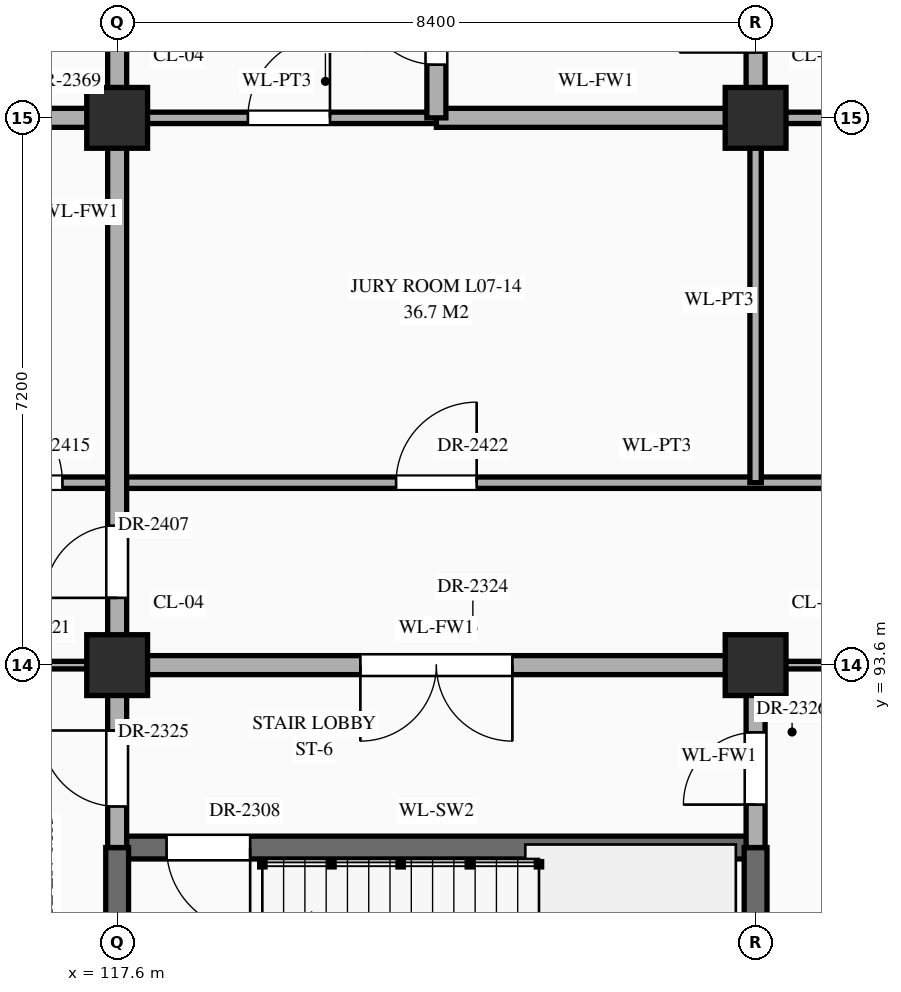
"""IFC4 building model, lengths in metres.
Left out: names, types, materials, properties, quantities, classifications, styles, units other than length and angle.
Written with IfcOpenShell. Run it as: python <this file> out.ifc"""

import sys

from ifc_helpers import new_model, si_unit, direction, frame, frame_2d, origin, origin_2d, place, context, subcontext, project, spatial, rectangle, extrude, element, fill, save


model = new_model("IFC4")
c1 = context("Model", 3, precision=1e-05, world=origin(), true_north=direction((0.0, 1.0)))
c2 = subcontext(c1, "Body", "Model", "MODEL_VIEW")
j1 = project(units=[si_unit("LENGTHUNIT", "METRE"), si_unit("PLANEANGLEUNIT", "RADIAN")], contexts=[c1])
p1 = place(None, origin())
s1 = spatial("IfcSite", under=j1, at=p1, CompositionType="ELEMENT")
p2 = place(p1, origin())
s2 = spatial("IfcBuilding", under=s1, at=p2, CompositionType="ELEMENT")
p3 = place(p2, frame((0.0, 0.0, 30.6)))
s3 = spatial("IfcBuildingStorey", under=s2, at=p3, CompositionType="ELEMENT", Elevation=30.6)
for number, where, z_axis, x_axis in (
    (1, (117.6, 93.6, 0.0), (0.0, 0.0, 1.0), (1.0, 0.0, 0.0)),
    (2, (117.6, 100.8, 0.0), (0.0, 0.0, 1.0), (1.0, 0.0, 0.0)),
    (3, (126.0, 93.6, 0.0), (0.0, 0.0, 1.0), (1.0, 0.0, 0.0)),
    (4, (126.0, 100.8, 0.0), (0.0, 0.0, 1.0), (1.0, 0.0, 0.0)),
):
    element("IfcColumn", number, at=place(p3, frame(where, z_axis=z_axis, x_axis=x_axis)), inside=s3, PredefinedType="COLUMN", context=c2, shape_type="SweptSolid", body=[
        extrude(rectangle(XDim=0.8, YDim=0.8, at=origin_2d()), origin(), (0.0, 0.0, 1.0), 4.5),
    ])
p4 = place(p3, frame((117.6, 91.2, 0.0), z_axis=(0.0, 0.0, 1.0), x_axis=(1.0, 0.0, 0.0)))
e5 = element("IfcWall", 5, at=p4, inside=s3, PredefinedType="SHEAR", context=c2, shape_type="SweptSolid", body=[
    extrude(rectangle(XDim=8.4, YDim=0.3, at=frame_2d((4.2, 0.0))), origin(), (0.0, 0.0, 1.0), 4.24),
])
p5 = place(p4, frame((0.65, 0.0, 0.0)))
e6 = element("IfcOpeningElement", 6, at=p5, cuts=e5, PredefinedType="OPENING", context=c2, shape_type="SweptSolid", body=[
    extrude(rectangle(XDim=1.1, YDim=2.2, at=frame_2d((0.55, 1.1))), frame((0.0, 0.162, 0.0), z_axis=(0.0, -1.0, 0.0), x_axis=(1.0, 0.0, 0.0)), (0.0, 0.0, 1.0), 0.324),
])
p6 = place(p3, frame((109.2, 93.6, 0.0), z_axis=(0.0, 0.0, 1.0), x_axis=(1.0, 0.0, 0.0)))
e7 = element("IfcWall", 7, at=p6, inside=s3, PredefinedType="STANDARD", context=c2, shape_type="SweptSolid", body=[
    extrude(rectangle(XDim=8.4, YDim=0.1, at=frame_2d((4.2, 0.0))), origin(), (0.0, 0.0, 1.0), 3.39),
])
p7 = place(p6, frame((1.09, 0.0, 0.0)))
e8 = element("IfcOpeningElement", 8, at=p7, cuts=e7, PredefinedType="OPENING", context=c2, shape_type="SweptSolid", body=[
    extrude(rectangle(XDim=0.94, YDim=2.3, at=frame_2d((0.47, 1.15))), frame((0.0, 0.062, 0.0), z_axis=(0.0, -1.0, 0.0), x_axis=(1.0, 0.0, 0.0)), (0.0, 0.0, 1.0), 0.124),
])
p8 = place(p6, frame((3.71, 0.0, 0.0)))
e9 = element("IfcOpeningElement", 9, at=p8, cuts=e7, PredefinedType="OPENING", context=c2, shape_type="SweptSolid", body=[
    extrude(rectangle(XDim=0.98, YDim=2.35, at=frame_2d((0.49, 1.175))), frame((0.0, 0.062, 0.0), z_axis=(0.0, -1.0, 0.0), x_axis=(1.0, 0.0, 0.0)), (0.0, 0.0, 1.0), 0.124),
])
p9 = place(p6, frame((6.33, 0.0, 0.0)))
e10 = element("IfcOpeningElement", 10, at=p9, cuts=e7, PredefinedType="OPENING", context=c2, shape_type="SweptSolid", body=[
    extrude(rectangle(XDim=1.02, YDim=2.4, at=frame_2d((0.51, 1.2))), frame((0.0, 0.062, 0.0), z_axis=(0.0, -1.0, 0.0), x_axis=(1.0, 0.0, 0.0)), (0.0, 0.0, 1.0), 0.124),
])
p10 = place(p3, frame((117.6, 93.6, 0.0), z_axis=(0.0, 0.0, 1.0), x_axis=(1.0, 0.0, 0.0)))
e11 = element("IfcWall", 11, at=p10, inside=s3, PredefinedType="STANDARD", context=c2, shape_type="SweptSolid", body=[
    extrude(rectangle(XDim=8.4, YDim=0.25, at=frame_2d((4.2, 0.0))), origin(), (0.0, 0.0, 1.0), 3.39),
])
p11 = place(p10, frame((3.2, 0.0, 0.0)))
e12 = element("IfcOpeningElement", 12, at=p11, cuts=e11, PredefinedType="OPENING", context=c2, shape_type="SweptSolid", body=[
    extrude(rectangle(XDim=2.0, YDim=2.4, at=frame_2d((1.0, 1.2))), frame((0.0, 0.137, 0.0), z_axis=(0.0, -1.0, 0.0), x_axis=(1.0, 0.0, 0.0)), (0.0, 0.0, 1.0), 0.274),
])
p12 = place(p3, frame((126.0, 93.6, 0.0), z_axis=(0.0, 0.0, 1.0), x_axis=(1.0, 0.0, 0.0)))
e13 = element("IfcWall", 13, at=p12, inside=s3, PredefinedType="STANDARD", context=c2, shape_type="SweptSolid", body=[
    extrude(rectangle(XDim=16.76, YDim=0.1, at=frame_2d((8.38, 0.0))), origin(), (0.0, 0.0, 1.0), 3.1),
])
p13 = place(p12, frame((3.88, 0.0, 0.0)))
e14 = element("IfcOpeningElement", 14, at=p13, cuts=e13, PredefinedType="OPENING", context=c2, shape_type="SweptSolid", body=[
    extrude(rectangle(XDim=0.96, YDim=2.2, at=frame_2d((0.48, 1.1))), frame((0.0, 0.062, 0.0), z_axis=(0.0, -1.0, 0.0), x_axis=(1.0, 0.0, 0.0)), (0.0, 0.0, 1.0), 0.124),
])
p14 = place(p12, frame((9.3, 0.0, 0.0)))
e15 = element("IfcOpeningElement", 15, at=p14, cuts=e13, PredefinedType="OPENING", context=c2, shape_type="SweptSolid", body=[
    extrude(rectangle(XDim=1.0, YDim=2.25, at=frame_2d((0.5, 1.125))), frame((0.0, 0.062, 0.0), z_axis=(0.0, -1.0, 0.0), x_axis=(1.0, 0.0, 0.0)), (0.0, 0.0, 1.0), 0.124),
])
p15 = place(p12, frame((11.7, 0.0, 0.0)))
e16 = element("IfcOpeningElement", 16, at=p15, cuts=e13, PredefinedType="OPENING", context=c2, shape_type="SweptSolid", body=[
    extrude(rectangle(XDim=1.8, YDim=2.5, at=frame_2d((0.9, 1.25))), frame((0.0, 0.062, 0.0), z_axis=(0.0, -1.0, 0.0), x_axis=(1.0, 0.0, 0.0)), (0.0, 0.0, 1.0), 0.124),
])
p16 = place(p12, frame((14.7, 0.0, 0.0)))
e17 = element("IfcOpeningElement", 17, at=p16, cuts=e13, PredefinedType="OPENING", context=c2, shape_type="SweptSolid", body=[
    extrude(rectangle(XDim=1.08, YDim=2.25, at=frame_2d((0.54, 1.125))), frame((0.0, 0.062, 0.0), z_axis=(0.0, -1.0, 0.0), x_axis=(1.0, 0.0, 0.0)), (0.0, 0.0, 1.0), 0.124),
])
p17 = place(p3, frame((115.0, 96.0, 0.0), z_axis=(0.0, 0.0, 1.0), x_axis=(1.0, 0.0, 0.0)))
e18 = element("IfcWall", 18, at=p17, inside=s3, PredefinedType="STANDARD", context=c2, shape_type="SweptSolid", body=[
    extrude(rectangle(XDim=19.4, YDim=0.15, at=frame_2d((9.7, 0.0))), origin(), (0.0, 0.0, 1.0), 4.24),
])
p18 = place(p17, frame((0.72, 0.0, 0.0)))
e19 = element("IfcOpeningElement", 19, at=p18, cuts=e18, PredefinedType="OPENING", context=c2, shape_type="SweptSolid", body=[
    extrude(rectangle(XDim=1.16, YDim=2.3, at=frame_2d((0.58, 1.15))), frame((0.0, 0.087, 0.0), z_axis=(0.0, -1.0, 0.0), x_axis=(1.0, 0.0, 0.0)), (0.0, 0.0, 1.0), 0.174),
])
p19 = place(p17, frame((6.27, 0.0, 0.0)))
e20 = element("IfcOpeningElement", 20, at=p19, cuts=e18, PredefinedType="OPENING", context=c2, shape_type="SweptSolid", body=[
    extrude(rectangle(XDim=1.06, YDim=2.4, at=frame_2d((0.53, 1.2))), frame((0.0, 0.087, 0.0), z_axis=(0.0, -1.0, 0.0), x_axis=(1.0, 0.0, 0.0)), (0.0, 0.0, 1.0), 0.174),
])
p20 = place(p17, frame((14.63, 0.0, 0.0)))
e21 = element("IfcOpeningElement", 21, at=p20, cuts=e18, PredefinedType="OPENING", context=c2, shape_type="SweptSolid", body=[
    extrude(rectangle(XDim=1.14, YDim=2.4, at=frame_2d((0.57, 1.2))), frame((0.0, 0.087, 0.0), z_axis=(0.0, -1.0, 0.0), x_axis=(1.0, 0.0, 0.0)), (0.0, 0.0, 1.0), 0.174),
])
p21 = place(p3, frame((113.4, 100.8, 0.0), z_axis=(0.0, 0.0, 1.0), x_axis=(1.0, 0.0, 0.0)))
e22 = element("IfcWall", 22, at=p21, inside=s3, PredefinedType="STANDARD", context=c2, shape_type="SweptSolid", body=[
    extrude(rectangle(XDim=4.2, YDim=0.25, at=frame_2d((2.1, 0.0))), origin(), (0.0, 0.0, 1.0), 3.39),
])
p22 = place(p21, frame((0.325, 0.0, 0.0)))
e23 = element("IfcOpeningElement", 23, at=p22, cuts=e22, PredefinedType="OPENING", context=c2, shape_type="SweptSolid", body=[
    extrude(rectangle(XDim=0.95, YDim=2.15, at=frame_2d((0.475, 1.075))), frame((0.0, 0.137, 0.0), z_axis=(0.0, -1.0, 0.0), x_axis=(1.0, 0.0, 0.0)), (0.0, 0.0, 1.0), 0.274),
])
p23 = place(p21, frame((2.19, 0.0, 0.0)))
e24 = element("IfcOpeningElement", 24, at=p23, cuts=e22, PredefinedType="OPENING", context=c2, shape_type="SweptSolid", body=[
    extrude(rectangle(XDim=1.1, YDim=2.2, at=frame_2d((0.55, 1.1))), frame((0.0, 0.137, 0.0), z_axis=(0.0, -1.0, 0.0), x_axis=(1.0, 0.0, 0.0)), (0.0, 0.0, 1.0), 0.274),
])
p24 = place(p3, frame((117.6, 100.8, 0.0), z_axis=(0.0, 0.0, 1.0), x_axis=(1.0, 0.0, 0.0)))
e25 = element("IfcWall", 25, at=p24, inside=s3, PredefinedType="STANDARD", context=c2, shape_type="SweptSolid", body=[
    extrude(rectangle(XDim=4.2, YDim=0.15, at=frame_2d((2.1, 0.0))), origin(), (0.0, 0.0, 1.0), 3.39),
])
p25 = place(p24, frame((1.72, 0.0, 0.0)))
e26 = element("IfcOpeningElement", 26, at=p25, cuts=e25, PredefinedType="OPENING", context=c2, shape_type="SweptSolid", body=[
    extrude(rectangle(XDim=1.08, YDim=2.25, at=frame_2d((0.54, 1.125))), frame((0.0, 0.087, 0.0), z_axis=(0.0, -1.0, 0.0), x_axis=(1.0, 0.0, 0.0)), (0.0, 0.0, 1.0), 0.174),
])
p26 = place(p3, frame((121.8, 100.8, 0.0), z_axis=(0.0, 0.0, 1.0), x_axis=(1.0, 0.0, 0.0)))
e27 = element("IfcWall", 27, at=p26, inside=s3, PredefinedType="STANDARD", context=c2, shape_type="SweptSolid", body=[
    extrude(rectangle(XDim=4.2, YDim=0.25, at=frame_2d((2.1, 0.0))), origin(), (0.0, 0.0, 1.0), 3.39),
])
p27 = place(p3, frame((126.0, 100.8, 0.0), z_axis=(0.0, 0.0, 1.0), x_axis=(1.0, 0.0, 0.0)))
e28 = element("IfcWall", 28, at=p27, inside=s3, PredefinedType="STANDARD", context=c2, shape_type="SweptSolid", body=[
    extrude(rectangle(XDim=8.4, YDim=0.15, at=frame_2d((4.2, 0.0))), origin(), (0.0, 0.0, 1.0), 3.3),
])
p28 = place(p27, frame((3.68, 0.0, 0.0)))
e29 = element("IfcOpeningElement", 29, at=p28, cuts=e28, PredefinedType="OPENING", context=c2, shape_type="SweptSolid", body=[
    extrude(rectangle(XDim=1.04, YDim=2.2, at=frame_2d((0.52, 1.1))), frame((0.0, 0.087, 0.0), z_axis=(0.0, -1.0, 0.0), x_axis=(1.0, 0.0, 0.0)), (0.0, 0.0, 1.0), 0.174),
])
p29 = place(p3, frame((117.6, 86.4, 0.0), z_axis=(0.0, 0.0, 1.0), x_axis=(0.0, 1.0, 0.0)))
e30 = element("IfcWall", 30, at=p29, inside=s3, PredefinedType="SHEAR", context=c2, shape_type="SweptSolid", body=[
    extrude(rectangle(XDim=4.8, YDim=0.3, at=frame_2d((2.4, 0.0))), origin(), (0.0, 0.0, 1.0), 4.24),
])
p30 = place(p3, frame((117.6, 91.2, 0.0), z_axis=(0.0, 0.0, 1.0), x_axis=(0.0, 1.0, 0.0)))
e31 = element("IfcWall", 31, at=p30, inside=s3, PredefinedType="STANDARD", context=c2, shape_type="SweptSolid", body=[
    extrude(rectangle(XDim=13.2, YDim=0.25, at=frame_2d((6.6, 0.0))), origin(), (0.0, 0.0, 1.0), 3.49),
])
p31 = place(p30, frame((0.54, 0.0, 0.0)))
e32 = element("IfcOpeningElement", 32, at=p31, cuts=e31, PredefinedType="OPENING", context=c2, shape_type="SweptSolid", body=[
    extrude(rectangle(XDim=1.0, YDim=2.2, at=frame_2d((0.5, 1.1))), frame((0.0, 0.137, 0.0), z_axis=(0.0, -1.0, 0.0), x_axis=(1.0, 0.0, 0.0)), (0.0, 0.0, 1.0), 0.274),
])
p32 = place(p30, frame((10.485, 0.0, 0.0)))
e33 = element("IfcOpeningElement", 33, at=p32, cuts=e31, PredefinedType="OPENING", context=c2, shape_type="SweptSolid", body=[
    extrude(rectangle(XDim=0.95, YDim=2.15, at=frame_2d((0.475, 1.075))), frame((0.0, 0.137, 0.0), z_axis=(0.0, -1.0, 0.0), x_axis=(1.0, 0.0, 0.0)), (0.0, 0.0, 1.0), 0.274),
])
p33 = place(p30, frame((3.285, 0.0, 0.0)))
e34 = element("IfcOpeningElement", 34, at=p33, cuts=e31, PredefinedType="OPENING", context=c2, shape_type="SweptSolid", body=[
    extrude(rectangle(XDim=0.95, YDim=2.15, at=frame_2d((0.475, 1.075))), frame((0.0, 0.137, 0.0), z_axis=(0.0, -1.0, 0.0), x_axis=(1.0, 0.0, 0.0)), (0.0, 0.0, 1.0), 0.274),
])
p34 = place(p3, frame((121.8, 100.8, 0.0), z_axis=(0.0, 0.0, 1.0), x_axis=(0.0, 1.0, 0.0)))
e35 = element("IfcWall", 35, at=p34, inside=s3, PredefinedType="STANDARD", context=c2, shape_type="SweptSolid", body=[
    extrude(rectangle(XDim=3.6, YDim=0.25, at=frame_2d((1.8, 0.0))), origin(), (0.0, 0.0, 1.0), 3.89),
])
p35 = place(p34, frame((0.7, 0.0, 0.0)))
e36 = element("IfcOpeningElement", 36, at=p35, cuts=e35, PredefinedType="OPENING", context=c2, shape_type="SweptSolid", body=[
    extrude(rectangle(XDim=1.0, YDim=2.2, at=frame_2d((0.5, 1.1))), frame((0.0, 0.137, 0.0), z_axis=(0.0, -1.0, 0.0), x_axis=(1.0, 0.0, 0.0)), (0.0, 0.0, 1.0), 0.274),
])
p36 = place(p3, frame((126.0, 86.4, 0.0), z_axis=(0.0, 0.0, 1.0), x_axis=(0.0, 1.0, 0.0)))
e37 = element("IfcWall", 37, at=p36, inside=s3, PredefinedType="SHEAR", context=c2, shape_type="SweptSolid", body=[
    extrude(rectangle(XDim=4.8, YDim=0.3, at=frame_2d((2.4, 0.0))), origin(), (0.0, 0.0, 1.0), 4.24),
])
p37 = place(p3, frame((126.0, 91.2, 0.0), z_axis=(0.0, 0.0, 1.0), x_axis=(0.0, 1.0, 0.0)))
e38 = element("IfcWall", 38, at=p37, inside=s3, PredefinedType="STANDARD", context=c2, shape_type="SweptSolid", body=[
    extrude(rectangle(XDim=2.4, YDim=0.25, at=frame_2d((1.2, 0.0))), origin(), (0.0, 0.0, 1.0), 3.4),
])
p38 = place(p37, frame((0.565, 0.0, 0.0)))
e39 = element("IfcOpeningElement", 39, at=p38, cuts=e38, PredefinedType="OPENING", context=c2, shape_type="SweptSolid", body=[
    extrude(rectangle(XDim=0.95, YDim=2.15, at=frame_2d((0.475, 1.075))), frame((0.0, 0.137, 0.0), z_axis=(0.0, -1.0, 0.0), x_axis=(1.0, 0.0, 0.0)), (0.0, 0.0, 1.0), 0.274),
])
p39 = place(p3, frame((126.0, 96.0, 0.0), z_axis=(0.0, 0.0, 1.0), x_axis=(0.0, 1.0, 0.0)))
e40 = element("IfcWall", 40, at=p39, inside=s3, PredefinedType="STANDARD", context=c2, shape_type="SweptSolid", body=[
    extrude(rectangle(XDim=4.8, YDim=0.15, at=frame_2d((2.4, 0.0))), origin(), (0.0, 0.0, 1.0), 3.4),
])
p40 = place(p3, frame((126.0, 100.8, 0.0), z_axis=(0.0, 0.0, 1.0), x_axis=(0.0, 1.0, 0.0)))
e41 = element("IfcWall", 41, at=p40, inside=s3, PredefinedType="STANDARD", context=c2, shape_type="SweptSolid", body=[
    extrude(rectangle(XDim=3.6, YDim=0.25, at=frame_2d((1.8, 0.0))), origin(), (0.0, 0.0, 1.0), 3.4),
])
p41 = place(p40, frame((0.86, 0.0, 0.0)))
e42 = element("IfcOpeningElement", 42, at=p41, cuts=e41, PredefinedType="OPENING", context=c2, shape_type="SweptSolid", body=[
    extrude(rectangle(XDim=1.0, YDim=2.2, at=frame_2d((0.5, 1.1))), frame((0.0, 0.137, 0.0), z_axis=(0.0, -1.0, 0.0), x_axis=(1.0, 0.0, 0.0)), (0.0, 0.0, 1.0), 0.274),
])
p42 = place(p5, frame((1.1, 0.0, 0.0), z_axis=(0.0, 0.0, 1.0), x_axis=(-1.0, 0.0, 0.0)))
e43 = element("IfcDoor", 43, at=p42, inside=s3, OperationType="SINGLE_SWING_LEFT", PredefinedType="DOOR", context=c2, shape_type="SweptSolid", body=[
    extrude(rectangle(XDim=1.1, YDim=2.2, at=frame_2d((0.55, 1.1))), frame((0.0, 0.025, 0.0), z_axis=(0.0, -1.0, 0.0), x_axis=(1.0, 0.0, 0.0)), (0.0, 0.0, 1.0), 0.05),
])
fill(e6, e43)
p43 = place(p11, frame((2.0, 0.0, 0.0), z_axis=(0.0, 0.0, 1.0), x_axis=(-1.0, 0.0, 0.0)))
e44 = element("IfcDoor", 44, at=p43, inside=s3, OperationType="DOUBLE_DOOR_SINGLE_SWING", PredefinedType="DOOR", context=c2, shape_type="SweptSolid", body=[
    extrude(rectangle(XDim=2.0, YDim=2.4, at=frame_2d((1.0, 1.2))), frame((0.0, 0.025, 0.0), z_axis=(0.0, -1.0, 0.0), x_axis=(1.0, 0.0, 0.0)), (0.0, 0.0, 1.0), 0.05),
])
fill(e12, e44)
p44 = place(p31, origin())
e45 = element("IfcDoor", 45, at=p44, inside=s3, OperationType="SINGLE_SWING_RIGHT", PredefinedType="DOOR", context=c2, shape_type="SweptSolid", body=[
    extrude(rectangle(XDim=1.0, YDim=2.2, at=frame_2d((0.5, 1.1))), frame((0.0, 0.025, 0.0), z_axis=(0.0, -1.0, 0.0), x_axis=(1.0, 0.0, 0.0)), (0.0, 0.0, 1.0), 0.05),
])
fill(e32, e45)
p45 = place(p38, origin())
e46 = element("IfcDoor", 46, at=p45, inside=s3, OperationType="SINGLE_SWING_LEFT", PredefinedType="DOOR", context=c2, shape_type="SweptSolid", body=[
    extrude(rectangle(XDim=0.95, YDim=2.15, at=frame_2d((0.475, 1.075))), frame((0.0, 0.025, 0.0), z_axis=(0.0, -1.0, 0.0), x_axis=(1.0, 0.0, 0.0)), (0.0, 0.0, 1.0), 0.05),
])
fill(e39, e46)
p46 = place(p35, origin())
e47 = element("IfcDoor", 47, at=p46, inside=s3, OperationType="SINGLE_SWING_RIGHT", PredefinedType="DOOR", context=c2, shape_type="SweptSolid", body=[
    extrude(rectangle(XDim=1.0, YDim=2.2, at=frame_2d((0.5, 1.1))), frame((0.0, 0.025, 0.0), z_axis=(0.0, -1.0, 0.0), x_axis=(1.0, 0.0, 0.0)), (0.0, 0.0, 1.0), 0.05),
])
fill(e36, e47)
p47 = place(p25, origin())
e48 = element("IfcDoor", 48, at=p47, inside=s3, OperationType="SINGLE_SWING_RIGHT", PredefinedType="DOOR", context=c2, shape_type="SweptSolid", body=[
    extrude(rectangle(XDim=1.08, YDim=2.25, at=frame_2d((0.54, 1.125))), frame((0.0, 0.025, 0.0), z_axis=(0.0, -1.0, 0.0), x_axis=(1.0, 0.0, 0.0)), (0.0, 0.0, 1.0), 0.05),
])
fill(e26, e48)
p48 = place(p33, origin())
e49 = element("IfcDoor", 49, at=p48, inside=s3, OperationType="SINGLE_SWING_LEFT", PredefinedType="DOOR", context=c2, shape_type="SweptSolid", body=[
    extrude(rectangle(XDim=0.95, YDim=2.15, at=frame_2d((0.475, 1.075))), frame((0.0, 0.025, 0.0), z_axis=(0.0, -1.0, 0.0), x_axis=(1.0, 0.0, 0.0)), (0.0, 0.0, 1.0), 0.05),
])
fill(e34, e49)
p49 = place(p18, origin())
e50 = element("IfcDoor", 50, at=p49, inside=s3, OperationType="SINGLE_SWING_LEFT", PredefinedType="DOOR", context=c2, shape_type="SweptSolid", body=[
    extrude(rectangle(XDim=1.16, YDim=2.3, at=frame_2d((0.58, 1.15))), frame((0.0, 0.025, 0.0), z_axis=(0.0, -1.0, 0.0), x_axis=(1.0, 0.0, 0.0)), (0.0, 0.0, 1.0), 0.05),
])
fill(e19, e50)
p50 = place(p19, origin())
e51 = element("IfcDoor", 51, at=p50, inside=s3, OperationType="SINGLE_SWING_RIGHT", PredefinedType="DOOR", context=c2, shape_type="SweptSolid", body=[
    extrude(rectangle(XDim=1.06, YDim=2.4, at=frame_2d((0.53, 1.2))), frame((0.0, 0.025, 0.0), z_axis=(0.0, -1.0, 0.0), x_axis=(1.0, 0.0, 0.0)), (0.0, 0.0, 1.0), 0.05),
])
fill(e20, e51)
save(model, sys.argv[1])
